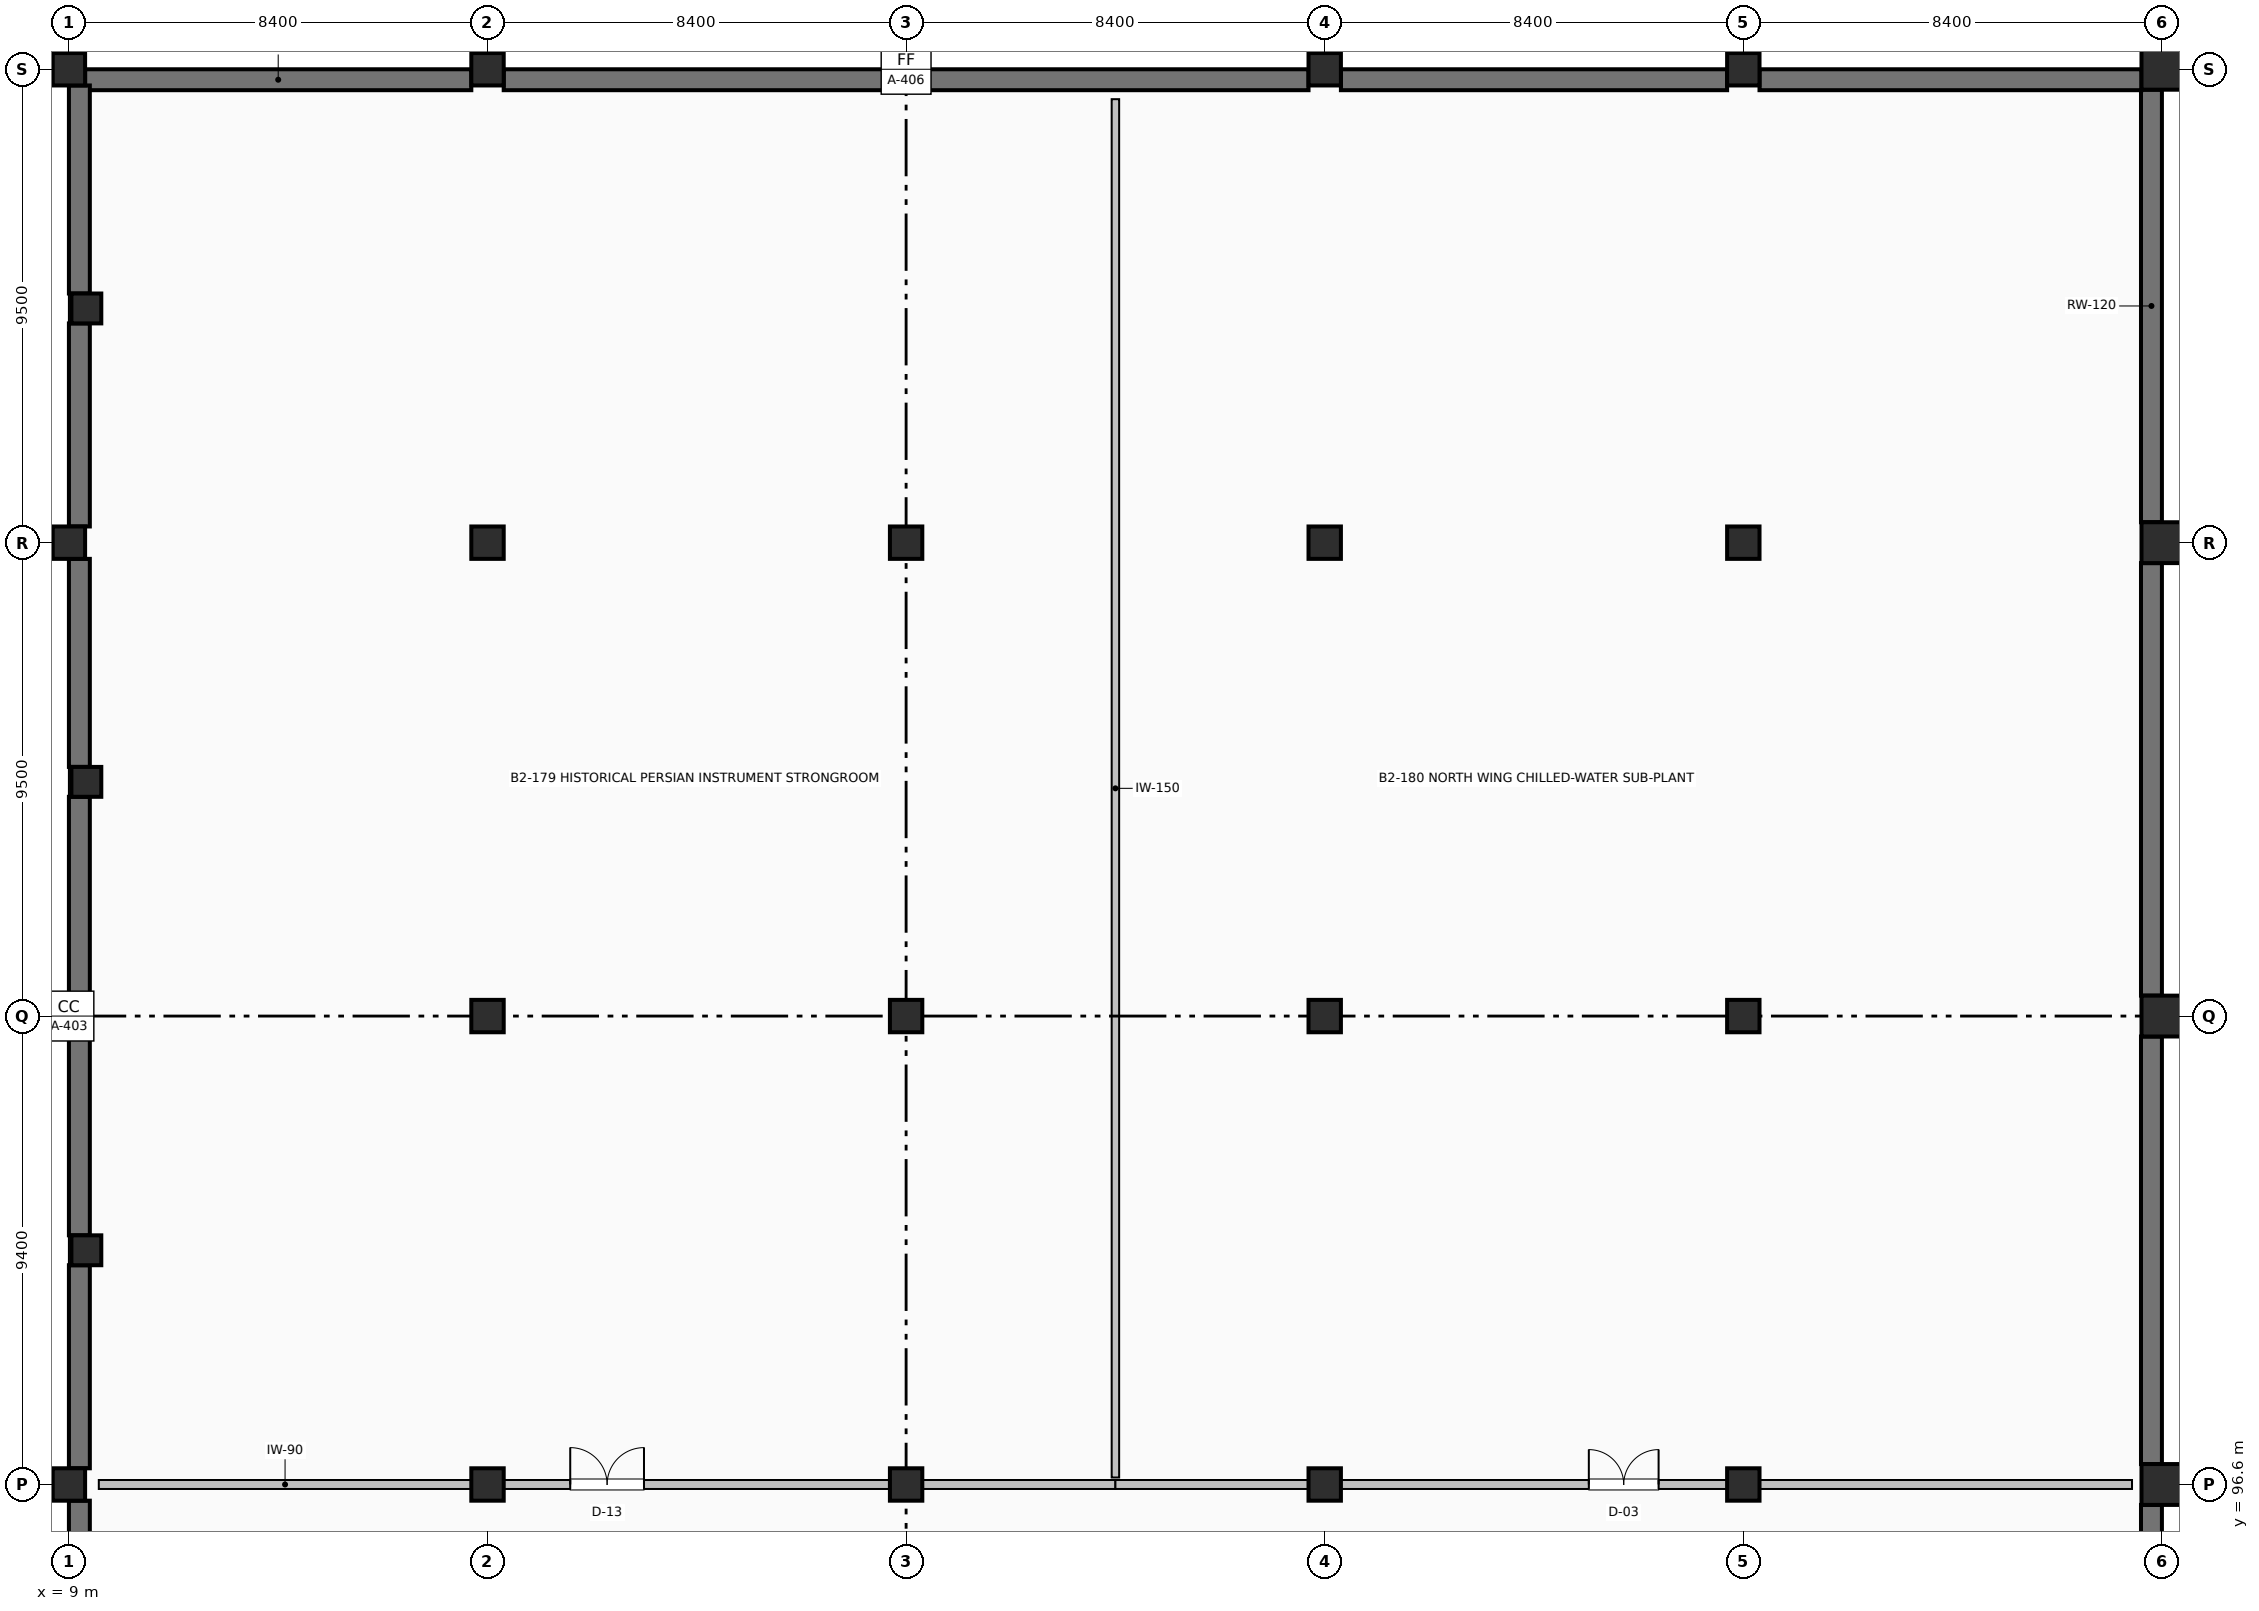
"""IFC4 building model, lengths in metres.
Left out: names, types, materials, properties, quantities, classifications, styles, units other than length and angle.
Written with IfcOpenShell. Run it as: python <this file> out.ifc"""

import sys

from ifc_helpers import new_model, si_unit, direction, frame, frame_2d, origin, origin_2d, place, context, subcontext, project, spatial, rectangle, extrude, element, fill, save


model = new_model("IFC4")
c1 = context("Model", 3, precision=1e-05, world=origin(), true_north=direction((0.0, 1.0)))
c2 = subcontext(c1, "Body", "Model", "MODEL_VIEW")
j1 = project(units=[si_unit("LENGTHUNIT", "METRE"), si_unit("PLANEANGLEUNIT", "RADIAN")], contexts=[c1])
p1 = place(None, origin())
s1 = spatial("IfcSite", under=j1, at=p1, CompositionType="ELEMENT")
p2 = place(p1, origin())
s2 = spatial("IfcBuilding", under=s1, at=p2, CompositionType="ELEMENT")
p3 = place(p2, frame((0.0, 0.0, -9.6)))
s3 = spatial("IfcBuildingStorey", under=s2, at=p3, CompositionType="ELEMENT", Elevation=-9.6)
for number, where, z_axis, x_axis in (
    (1, (9.0, 96.6, 0.0), (0.0, 0.0, 1.0), (1.0, 0.0, 0.0)),
    (2, (9.0, 106.0, 0.0), (0.0, 0.0, 1.0), (1.0, 0.0, 0.0)),
    (3, (9.0, 115.5, 0.0), (0.0, 0.0, 1.0), (1.0, 0.0, 0.0)),
    (4, (9.0, 125.0, 0.0), (0.0, 0.0, 1.0), (1.0, 0.0, 0.0)),
    (5, (17.4, 96.6, 0.0), (0.0, 0.0, 1.0), (1.0, 0.0, 0.0)),
    (6, (17.4, 106.0, 0.0), (0.0, 0.0, 1.0), (1.0, 0.0, 0.0)),
    (7, (17.4, 115.5, 0.0), (0.0, 0.0, 1.0), (1.0, 0.0, 0.0)),
    (8, (17.4, 125.0, 0.0), (0.0, 0.0, 1.0), (1.0, 0.0, 0.0)),
    (9, (25.8, 96.6, 0.0), (0.0, 0.0, 1.0), (1.0, 0.0, 0.0)),
    (10, (25.8, 106.0, 0.0), (0.0, 0.0, 1.0), (1.0, 0.0, 0.0)),
    (11, (25.8, 115.5, 0.0), (0.0, 0.0, 1.0), (1.0, 0.0, 0.0)),
    (12, (25.8, 125.0, 0.0), (0.0, 0.0, 1.0), (1.0, 0.0, 0.0)),
    (13, (34.2, 96.6, 0.0), (0.0, 0.0, 1.0), (1.0, 0.0, 0.0)),
    (14, (34.2, 106.0, 0.0), (0.0, 0.0, 1.0), (1.0, 0.0, 0.0)),
    (15, (34.2, 115.5, 0.0), (0.0, 0.0, 1.0), (1.0, 0.0, 0.0)),
    (16, (34.2, 125.0, 0.0), (0.0, 0.0, 1.0), (1.0, 0.0, 0.0)),
    (17, (42.6, 96.6, 0.0), (0.0, 0.0, 1.0), (1.0, 0.0, 0.0)),
    (18, (42.6, 106.0, 0.0), (0.0, 0.0, 1.0), (1.0, 0.0, 0.0)),
    (19, (42.6, 115.5, 0.0), (0.0, 0.0, 1.0), (1.0, 0.0, 0.0)),
    (20, (42.6, 125.0, 0.0), (0.0, 0.0, 1.0), (1.0, 0.0, 0.0)),
):
    element("IfcColumn", number, at=place(p3, frame(where, z_axis=z_axis, x_axis=x_axis)), inside=s3, PredefinedType="COLUMN", context=c2, shape_type="SweptSolid", body=[
        extrude(rectangle(XDim=0.65, YDim=0.65, at=origin_2d()), origin(), (0.0, 0.0, 1.0), 4.8),
    ])
for number, where, z_axis, x_axis in (
    (21, (51.0, 96.6, 0.0), (0.0, 0.0, 1.0), (1.0, 0.0, 0.0)),
    (22, (51.0, 106.0, 0.0), (0.0, 0.0, 1.0), (1.0, 0.0, 0.0)),
    (23, (51.0, 115.5, 0.0), (0.0, 0.0, 1.0), (1.0, 0.0, 0.0)),
    (24, (51.0, 125.0, 0.0), (0.0, 0.0, 1.0), (1.0, 0.0, 0.0)),
):
    element("IfcColumn", number, at=place(p3, frame(where, z_axis=z_axis, x_axis=x_axis)), inside=s3, PredefinedType="COLUMN", context=c2, shape_type="SweptSolid", body=[
        extrude(rectangle(XDim=0.82, YDim=0.82, at=origin_2d()), origin(), (0.0, 0.0, 1.0), 4.8),
    ])
for number, where, z_axis, x_axis in (
    (25, (9.35, 101.3, 0.0), (0.0, 0.0, 1.0), (1.0, 0.0, 0.0)),
    (26, (9.35, 110.7, 0.0), (0.0, 0.0, 1.0), (1.0, 0.0, 0.0)),
    (27, (9.35, 120.2, 0.0), (0.0, 0.0, 1.0), (1.0, 0.0, 0.0)),
):
    element("IfcColumn", number, at=place(p3, frame(where, z_axis=z_axis, x_axis=x_axis)), inside=s3, PredefinedType="COLUMN", context=c2, shape_type="SweptSolid", body=[
        extrude(rectangle(XDim=0.6, YDim=0.6, at=origin_2d()), origin(), (0.0, 0.0, 1.0), 4.8),
    ])
for number, where, z_axis, x_axis in (
    (28, (50.79, 124.59, 0.0), (0.0, 0.0, 1.0), (0.0, -1.0, 0.0)),
    (29, (50.79, 115.09, 0.0), (0.0, 0.0, 1.0), (0.0, -1.0, 0.0)),
):
    element("IfcWall", number, at=place(p3, frame(where, z_axis=z_axis, x_axis=x_axis)), inside=s3, PredefinedType="SHEAR", context=c2, shape_type="SweptSolid", body=[
        extrude(rectangle(XDim=8.68, YDim=0.42, at=frame_2d((4.34, 0.0))), origin(), (0.0, 0.0, 1.0), 4.5),
    ])
p4 = place(p3, frame((50.79, 105.59, 0.0), z_axis=(0.0, 0.0, 1.0), x_axis=(0.0, -1.0, 0.0)))
e30 = element("IfcWall", 30, at=p4, inside=s3, PredefinedType="SHEAR", context=c2, shape_type="SweptSolid", body=[
    extrude(rectangle(XDim=8.58, YDim=0.42, at=frame_2d((4.29, 0.0))), origin(), (0.0, 0.0, 1.0), 4.5),
])
p5 = place(p3, frame((50.79, 96.19, 0.0), z_axis=(0.0, 0.0, 1.0), x_axis=(0.0, -1.0, 0.0)))
e31 = element("IfcWall", 31, at=p5, inside=s3, PredefinedType="SHEAR", context=c2, shape_type="SweptSolid", body=[
    extrude(rectangle(XDim=8.58, YDim=0.42, at=frame_2d((4.29, 0.0))), origin(), (0.0, 0.0, 1.0), 4.5),
])
for number, where, z_axis, x_axis in (
    (32, (9.325, 124.79, 0.0), (0.0, 0.0, 1.0), (1.0, 0.0, 0.0)),
    (33, (17.725, 124.79, 0.0), (0.0, 0.0, 1.0), (1.0, 0.0, 0.0)),
    (34, (26.125, 124.79, 0.0), (0.0, 0.0, 1.0), (1.0, 0.0, 0.0)),
    (35, (34.525, 124.79, 0.0), (0.0, 0.0, 1.0), (1.0, 0.0, 0.0)),
):
    element("IfcWall", number, at=place(p3, frame(where, z_axis=z_axis, x_axis=x_axis)), inside=s3, PredefinedType="SHEAR", context=c2, shape_type="SweptSolid", body=[
        extrude(rectangle(XDim=7.75, YDim=0.42, at=frame_2d((3.875, 0.0))), origin(), (0.0, 0.0, 1.0), 4.5),
    ])
p6 = place(p3, frame((42.925, 124.79, 0.0), z_axis=(0.0, 0.0, 1.0), x_axis=(1.0, 0.0, 0.0)))
e36 = element("IfcWall", 36, at=p6, inside=s3, PredefinedType="SHEAR", context=c2, shape_type="SweptSolid", body=[
    extrude(rectangle(XDim=7.665, YDim=0.42, at=frame_2d((3.833, 0.0))), origin(), (0.0, 0.0, 1.0), 4.5),
])
for number, where, z_axis, x_axis in (
    (37, (9.21, 92.2, 0.0), (0.0, 0.0, 1.0), (0.0, 1.0, 0.0)),
    (38, (9.21, 96.925, 0.0), (0.0, 0.0, 1.0), (0.0, 1.0, 0.0)),
    (39, (9.21, 101.6, 0.0), (0.0, 0.0, 1.0), (0.0, 1.0, 0.0)),
    (40, (9.21, 106.325, 0.0), (0.0, 0.0, 1.0), (0.0, 1.0, 0.0)),
):
    element("IfcWall", number, at=place(p3, frame(where, z_axis=z_axis, x_axis=x_axis)), inside=s3, PredefinedType="SHEAR", context=c2, shape_type="SweptSolid", body=[
        extrude(rectangle(XDim=4.075, YDim=0.42, at=frame_2d((2.038, 0.0))), origin(), (0.0, 0.0, 1.0), 4.5),
    ])
p7 = place(p3, frame((9.21, 111.0, 0.0), z_axis=(0.0, 0.0, 1.0), x_axis=(0.0, 1.0, 0.0)))
e41 = element("IfcWall", 41, at=p7, inside=s3, PredefinedType="SHEAR", context=c2, shape_type="SweptSolid", body=[
    extrude(rectangle(XDim=4.175, YDim=0.42, at=frame_2d((2.087, 0.0))), origin(), (0.0, 0.0, 1.0), 4.5),
])
p8 = place(p3, frame((9.21, 115.825, 0.0), z_axis=(0.0, 0.0, 1.0), x_axis=(0.0, 1.0, 0.0)))
e42 = element("IfcWall", 42, at=p8, inside=s3, PredefinedType="SHEAR", context=c2, shape_type="SweptSolid", body=[
    extrude(rectangle(XDim=4.075, YDim=0.42, at=frame_2d((2.038, 0.0))), origin(), (0.0, 0.0, 1.0), 4.5),
])
p9 = place(p3, frame((9.21, 120.5, 0.0), z_axis=(0.0, 0.0, 1.0), x_axis=(0.0, 1.0, 0.0)))
e43 = element("IfcWall", 43, at=p9, inside=s3, PredefinedType="SHEAR", context=c2, shape_type="SweptSolid", body=[
    extrude(rectangle(XDim=4.175, YDim=0.42, at=frame_2d((2.087, 0.0))), origin(), (0.0, 0.0, 1.0), 4.5),
])
p10 = place(p3, frame((9.6, 96.6, 0.0), z_axis=(0.0, 0.0, 1.0), x_axis=(1.0, 0.0, 0.0)))
e44 = element("IfcWall", 44, at=p10, inside=s3, PredefinedType="PARTITIONING", context=c2, shape_type="SweptSolid", body=[
    extrude(rectangle(XDim=7.475, YDim=0.18, at=frame_2d((3.737, 0.0))), origin(), (0.0, 0.0, 1.0), 3.642),
])
p11 = place(p3, frame((17.725, 96.6, 0.0), z_axis=(0.0, 0.0, 1.0), x_axis=(1.0, 0.0, 0.0)))
e45 = element("IfcWall", 45, at=p11, inside=s3, PredefinedType="PARTITIONING", context=c2, shape_type="SweptSolid", body=[
    extrude(rectangle(XDim=7.75, YDim=0.18, at=frame_2d((3.875, 0.0))), origin(), (0.0, 0.0, 1.0), 3.642),
])
p12 = place(p11, frame((1.335, 0.0, 0.0)))
e46 = element("IfcOpeningElement", 46, at=p12, cuts=e45, PredefinedType="OPENING", context=c2, shape_type="SweptSolid", body=[
    extrude(rectangle(XDim=1.48, YDim=2.18, at=frame_2d((0.74, 1.09))), frame((0.0, 0.1, 0.0), z_axis=(0.0, -1.0, 0.0), x_axis=(1.0, 0.0, 0.0)), (0.0, 0.0, 1.0), 0.2),
])
p13 = place(p3, frame((26.125, 96.6, 0.0), z_axis=(0.0, 0.0, 1.0), x_axis=(1.0, 0.0, 0.0)))
e47 = element("IfcWall", 47, at=p13, inside=s3, PredefinedType="PARTITIONING", context=c2, shape_type="SweptSolid", body=[
    extrude(rectangle(XDim=3.875, YDim=0.18, at=frame_2d((1.938, 0.0))), origin(), (0.0, 0.0, 1.0), 3.642),
])
p14 = place(p3, frame((30.0, 96.74, 0.0), z_axis=(0.0, 0.0, 1.0), x_axis=(0.0, 1.0, 0.0)))
e48 = element("IfcWall", 48, at=p14, inside=s3, PredefinedType="PARTITIONING", context=c2, shape_type="SweptSolid", body=[
    extrude(rectangle(XDim=27.66, YDim=0.15, at=frame_2d((13.83, 0.0))), origin(), (0.0, 0.0, 1.0), 4.492),
])
p15 = place(p3, frame((30.0, 96.6, 0.0), z_axis=(0.0, 0.0, 1.0), x_axis=(1.0, 0.0, 0.0)))
e49 = element("IfcWall", 49, at=p15, inside=s3, PredefinedType="PARTITIONING", context=c2, shape_type="SweptSolid", body=[
    extrude(rectangle(XDim=3.875, YDim=0.18, at=frame_2d((1.938, 0.0))), origin(), (0.0, 0.0, 1.0), 3.642),
])
p16 = place(p3, frame((34.525, 96.6, 0.0), z_axis=(0.0, 0.0, 1.0), x_axis=(1.0, 0.0, 0.0)))
e50 = element("IfcWall", 50, at=p16, inside=s3, PredefinedType="PARTITIONING", context=c2, shape_type="SweptSolid", body=[
    extrude(rectangle(XDim=7.75, YDim=0.18, at=frame_2d((3.875, 0.0))), origin(), (0.0, 0.0, 1.0), 3.642),
])
p17 = place(p16, frame((4.975, 0.0, 0.0)))
e51 = element("IfcOpeningElement", 51, at=p17, cuts=e50, PredefinedType="OPENING", context=c2, shape_type="SweptSolid", body=[
    extrude(rectangle(XDim=1.4, YDim=2.12, at=frame_2d((0.7, 1.06))), frame((0.0, 0.1, 0.0), z_axis=(0.0, -1.0, 0.0), x_axis=(1.0, 0.0, 0.0)), (0.0, 0.0, 1.0), 0.2),
])
p18 = place(p3, frame((42.925, 96.6, 0.0), z_axis=(0.0, 0.0, 1.0), x_axis=(1.0, 0.0, 0.0)))
e52 = element("IfcWall", 52, at=p18, inside=s3, PredefinedType="PARTITIONING", context=c2, shape_type="SweptSolid", body=[
    extrude(rectangle(XDim=7.475, YDim=0.18, at=frame_2d((3.737, 0.0))), origin(), (0.0, 0.0, 1.0), 3.642),
])
p19 = place(p12, origin())
e53 = element("IfcDoor", 53, at=p19, inside=s3, OperationType="DOUBLE_DOOR_SINGLE_SWING", PredefinedType="DOOR", context=c2, shape_type="SweptSolid", body=[
    extrude(rectangle(XDim=1.48, YDim=2.18, at=frame_2d((0.74, 1.09))), frame((0.0, 0.025, 0.0), z_axis=(0.0, -1.0, 0.0), x_axis=(1.0, 0.0, 0.0)), (0.0, 0.0, 1.0), 0.05),
])
fill(e46, e53)
p20 = place(p17, origin())
e54 = element("IfcDoor", 54, at=p20, inside=s3, OperationType="DOUBLE_DOOR_SINGLE_SWING", PredefinedType="DOOR", context=c2, shape_type="SweptSolid", body=[
    extrude(rectangle(XDim=1.4, YDim=2.12, at=frame_2d((0.7, 1.06))), frame((0.0, 0.025, 0.0), z_axis=(0.0, -1.0, 0.0), x_axis=(1.0, 0.0, 0.0)), (0.0, 0.0, 1.0), 0.05),
])
fill(e51, e54)
save(model, sys.argv[1])
